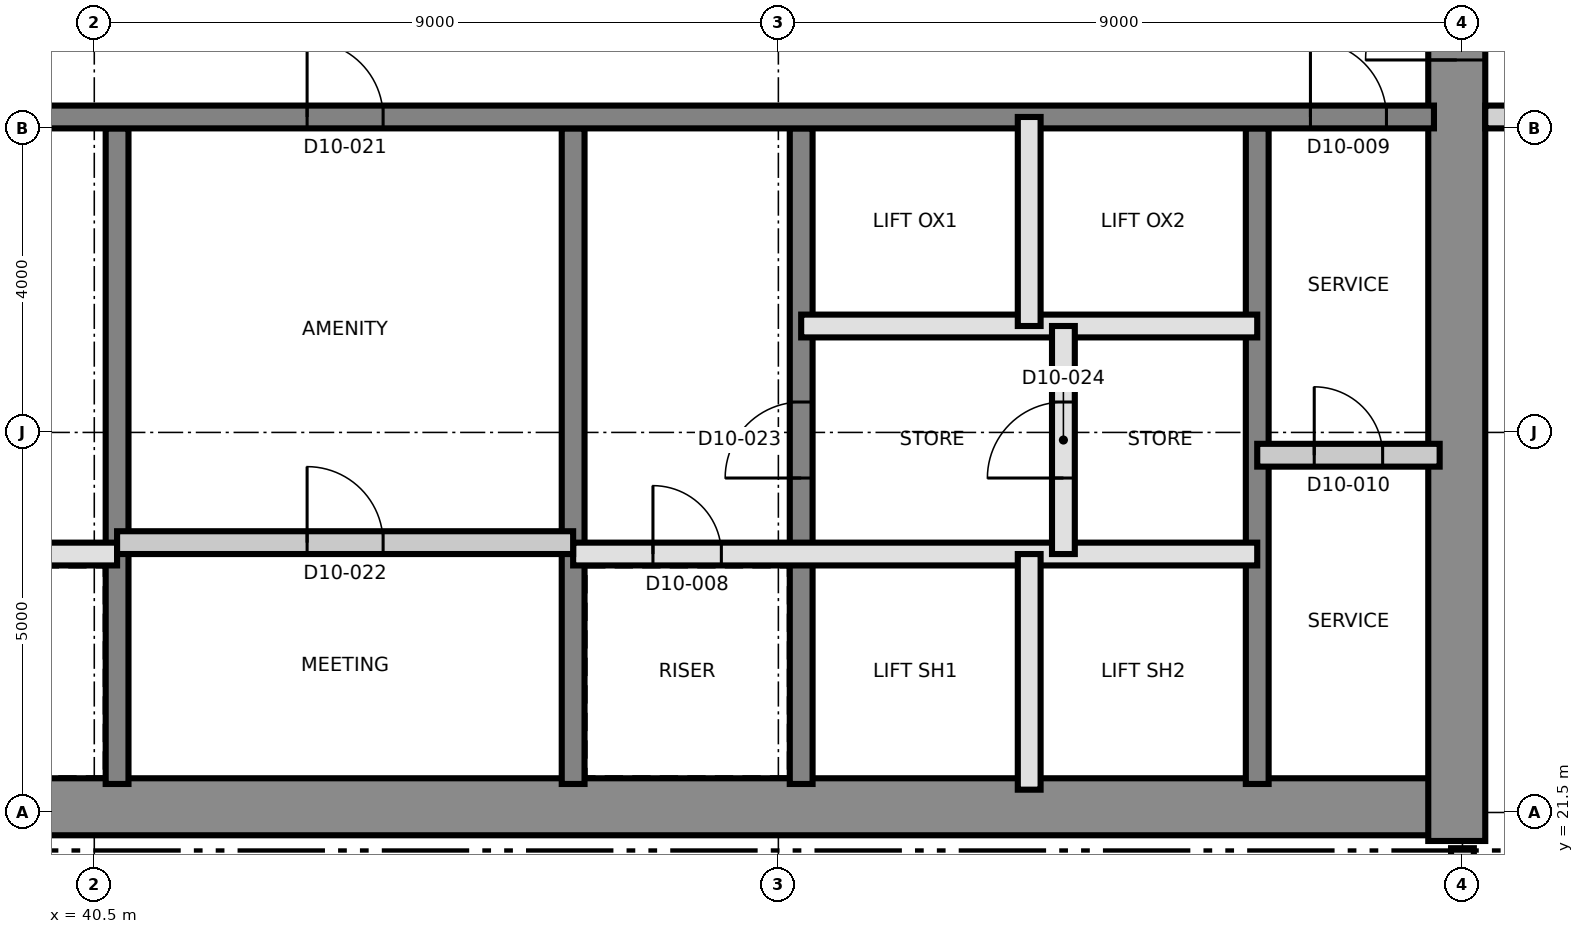
"""IFC4 building model, lengths in metres.
Left out: names, types, materials, properties, quantities, classifications, styles, units other than length and angle.
Written with IfcOpenShell. Run it as: python <this file> out.ifc"""

import sys

from ifc_helpers import new_model, si_unit, direction, frame, frame_2d, origin, place, context, subcontext, project, spatial, rectangle, extrude, element, fill, save


model = new_model("IFC4")
c1 = context("Model", 3, precision=1e-05, world=origin(), true_north=direction((0.0, 1.0)))
c2 = subcontext(c1, "Body", "Model", "MODEL_VIEW")
j1 = project(units=[si_unit("LENGTHUNIT", "METRE"), si_unit("PLANEANGLEUNIT", "RADIAN")], contexts=[c1])
p1 = place(None, origin())
s1 = spatial("IfcSite", under=j1, at=p1, CompositionType="ELEMENT")
p2 = place(p1, origin())
s2 = spatial("IfcBuilding", under=s1, at=p2, CompositionType="ELEMENT")
p3 = place(p2, frame((0.0, 0.0, 116.7)))
s3 = spatial("IfcBuildingStorey", under=s2, at=p3, CompositionType="ELEMENT", Elevation=116.7)
p4 = place(p3, frame((31.125, 21.575, 0.0), z_axis=(0.0, 0.0, 1.0), x_axis=(1.0, 0.0, 0.0)))
e1 = element("IfcWall", 1, at=p4, inside=s3, PredefinedType="SHEAR", context=c2, shape_type="SweptSolid", body=[
    extrude(rectangle(XDim=27.0, YDim=0.75, at=frame_2d((13.5, 0.0))), origin(), (0.0, 0.0, 1.0), 3.7),
])
p5 = place(p3, frame((58.425, 21.125, 0.0), z_axis=(0.0, 0.0, 1.0), x_axis=(0.0, 1.0, 0.0)))
e2 = element("IfcWall", 2, at=p5, inside=s3, PredefinedType="SHEAR", context=c2, shape_type="SweptSolid", body=[
    extrude(rectangle(XDim=18.75, YDim=0.75, at=frame_2d((9.375, 0.0))), origin(), (0.0, 0.0, 1.0), 3.7),
])
p6 = place(p5, frame((10.275, 0.0, 0.0)))
e3 = element("IfcOpeningElement", 3, at=p6, cuts=e2, PredefinedType="OPENING", context=c2, shape_type="SweptSolid", body=[
    extrude(rectangle(XDim=1.2, YDim=2.1, at=frame_2d((0.6, 1.05))), frame((0.0, 0.385, 0.0), z_axis=(0.0, -1.0, 0.0), x_axis=(1.0, 0.0, 0.0)), (0.0, 0.0, 1.0), 0.77),
])
for number, where, z_axis, x_axis in (
    (4, (40.8, 21.875, 0.0), (0.0, 0.0, 1.0), (0.0, 1.0, 0.0)),
    (5, (46.8, 21.875, 0.0), (0.0, 0.0, 1.0), (0.0, 1.0, 0.0)),
):
    element("IfcWall", number, at=place(p3, frame(where, z_axis=z_axis, x_axis=x_axis)), inside=s3, PredefinedType="SHEAR", context=c2, shape_type="SweptSolid", body=[
        extrude(rectangle(XDim=8.625, YDim=0.3, at=frame_2d((4.312, 0.0))), origin(), (0.0, 0.0, 1.0), 3.7),
    ])
p7 = place(p3, frame((49.8, 21.875, 0.0), z_axis=(0.0, 0.0, 1.0), x_axis=(0.0, 1.0, 0.0)))
e6 = element("IfcWall", 6, at=p7, inside=s3, PredefinedType="SHEAR", context=c2, shape_type="SweptSolid", body=[
    extrude(rectangle(XDim=8.625, YDim=0.3, at=frame_2d((4.312, 0.0))), origin(), (0.0, 0.0, 1.0), 3.7),
])
p8 = place(p7, frame((4.025, 0.0, 0.0)))
e7 = element("IfcOpeningElement", 7, at=p8, cuts=e6, PredefinedType="OPENING", context=c2, shape_type="SweptSolid", body=[
    extrude(rectangle(XDim=1.0, YDim=2.1, at=frame_2d((0.5, 1.05))), frame((0.0, 0.16, 0.0), z_axis=(0.0, -1.0, 0.0), x_axis=(1.0, 0.0, 0.0)), (0.0, 0.0, 1.0), 0.32),
])
p9 = place(p3, frame((55.8, 21.875, 0.0), z_axis=(0.0, 0.0, 1.0), x_axis=(0.0, 1.0, 0.0)))
e8 = element("IfcWall", 8, at=p9, inside=s3, PredefinedType="SHEAR", context=c2, shape_type="SweptSolid", body=[
    extrude(rectangle(XDim=8.625, YDim=0.3, at=frame_2d((4.312, 0.0))), origin(), (0.0, 0.0, 1.0), 3.7),
])
p10 = place(p3, frame((31.875, 30.65, 0.0), z_axis=(0.0, 0.0, 1.0), x_axis=(1.0, 0.0, 0.0)))
e9 = element("IfcWall", 9, at=p10, inside=s3, PredefinedType="SHEAR", context=c2, shape_type="SweptSolid", body=[
    extrude(rectangle(XDim=26.25, YDim=0.3, at=frame_2d((13.125, 0.0))), origin(), (0.0, 0.0, 1.0), 3.7),
])
p11 = place(p10, frame((24.625, 0.0, 0.0)))
e10 = element("IfcOpeningElement", 10, at=p11, cuts=e9, PredefinedType="OPENING", context=c2, shape_type="SweptSolid", body=[
    extrude(rectangle(XDim=1.0, YDim=2.1, at=frame_2d((0.5, 1.05))), frame((0.0, 0.16, 0.0), z_axis=(0.0, -1.0, 0.0), x_axis=(1.0, 0.0, 0.0)), (0.0, 0.0, 1.0), 0.32),
])
p12 = place(p10, frame((11.425, 0.0, 0.0)))
e11 = element("IfcOpeningElement", 11, at=p12, cuts=e9, PredefinedType="OPENING", context=c2, shape_type="SweptSolid", body=[
    extrude(rectangle(XDim=1.0, YDim=2.1, at=frame_2d((0.5, 1.05))), frame((0.0, 0.16, 0.0), z_axis=(0.0, -1.0, 0.0), x_axis=(1.0, 0.0, 0.0)), (0.0, 0.0, 1.0), 0.32),
])
p13 = place(p3, frame((31.8, 24.9, 0.0), z_axis=(0.0, 0.0, 1.0), x_axis=(1.0, 0.0, 0.0)))
e12 = element("IfcWall", 12, at=p13, inside=s3, PredefinedType="SOLIDWALL", context=c2, shape_type="SweptSolid", body=[
    extrude(rectangle(XDim=9.0, YDim=0.3, at=frame_2d((4.5, 0.0))), origin(), (0.0, 0.0, 1.0), 3.4),
])
p14 = place(p13, frame((7.05, 0.0, 0.0)))
e13 = element("IfcOpeningElement", 13, at=p14, cuts=e12, PredefinedType="OPENING", context=c2, shape_type="SweptSolid", body=[
    extrude(rectangle(XDim=0.9, YDim=2.1, at=frame_2d((0.45, 1.05))), frame((0.0, 0.16, 0.0), z_axis=(0.0, -1.0, 0.0), x_axis=(1.0, 0.0, 0.0)), (0.0, 0.0, 1.0), 0.32),
])
p15 = place(p13, frame((0.95, 0.0, 0.0)))
e14 = element("IfcOpeningElement", 14, at=p15, cuts=e12, PredefinedType="OPENING", context=c2, shape_type="SweptSolid", body=[
    extrude(rectangle(XDim=1.1, YDim=2.4, at=frame_2d((0.55, 1.2))), frame((0.0, 0.16, 0.0), z_axis=(0.0, -1.0, 0.0), x_axis=(1.0, 0.0, 0.0)), (0.0, 0.0, 1.0), 0.32),
])
p16 = place(p13, frame((3.95, 0.0, 0.0)))
e15 = element("IfcOpeningElement", 15, at=p16, cuts=e12, PredefinedType="OPENING", context=c2, shape_type="SweptSolid", body=[
    extrude(rectangle(XDim=1.1, YDim=2.4, at=frame_2d((0.55, 1.2))), frame((0.0, 0.16, 0.0), z_axis=(0.0, -1.0, 0.0), x_axis=(1.0, 0.0, 0.0)), (0.0, 0.0, 1.0), 0.32),
])
p17 = place(p3, frame((46.8, 24.9, 0.0), z_axis=(0.0, 0.0, 1.0), x_axis=(1.0, 0.0, 0.0)))
e16 = element("IfcWall", 16, at=p17, inside=s3, PredefinedType="SOLIDWALL", context=c2, shape_type="SweptSolid", body=[
    extrude(rectangle(XDim=9.0, YDim=0.3, at=frame_2d((4.5, 0.0))), origin(), (0.0, 0.0, 1.0), 3.4),
])
p18 = place(p17, frame((1.05, 0.0, 0.0)))
e17 = element("IfcOpeningElement", 17, at=p18, cuts=e16, PredefinedType="OPENING", context=c2, shape_type="SweptSolid", body=[
    extrude(rectangle(XDim=0.9, YDim=2.1, at=frame_2d((0.45, 1.05))), frame((0.0, 0.16, 0.0), z_axis=(0.0, -1.0, 0.0), x_axis=(1.0, 0.0, 0.0)), (0.0, 0.0, 1.0), 0.32),
])
p19 = place(p3, frame((40.8, 25.05, 0.0), z_axis=(0.0, 0.0, 1.0), x_axis=(1.0, 0.0, 0.0)))
e18 = element("IfcWall", 18, at=p19, inside=s3, PredefinedType="PARTITIONING", context=c2, shape_type="SweptSolid", body=[
    extrude(rectangle(XDim=6.0, YDim=0.3, at=frame_2d((3.0, 0.0))), origin(), (0.0, 0.0, 1.0), 3.4),
])
p20 = place(p19, frame((2.5, 0.0, 0.0)))
e19 = element("IfcOpeningElement", 19, at=p20, cuts=e18, PredefinedType="OPENING", context=c2, shape_type="SweptSolid", body=[
    extrude(rectangle(XDim=1.0, YDim=2.1, at=frame_2d((0.5, 1.05))), frame((0.0, 0.16, 0.0), z_axis=(0.0, -1.0, 0.0), x_axis=(1.0, 0.0, 0.0)), (0.0, 0.0, 1.0), 0.32),
])
p21 = place(p3, frame((55.8, 26.2, 0.0), z_axis=(0.0, 0.0, 1.0), x_axis=(1.0, 0.0, 0.0)))
e20 = element("IfcWall", 20, at=p21, inside=s3, PredefinedType="PARTITIONING", context=c2, shape_type="SweptSolid", body=[
    extrude(rectangle(XDim=2.4, YDim=0.3, at=frame_2d((1.2, 0.0))), origin(), (0.0, 0.0, 1.0), 3.4),
])
p22 = place(p21, frame((0.75, 0.0, 0.0)))
e21 = element("IfcOpeningElement", 21, at=p22, cuts=e20, PredefinedType="OPENING", context=c2, shape_type="SweptSolid", body=[
    extrude(rectangle(XDim=0.9, YDim=2.1, at=frame_2d((0.45, 1.05))), frame((0.0, 0.16, 0.0), z_axis=(0.0, -1.0, 0.0), x_axis=(1.0, 0.0, 0.0)), (0.0, 0.0, 1.0), 0.32),
])
p23 = place(p3, frame((49.8, 27.9, 0.0), z_axis=(0.0, 0.0, 1.0), x_axis=(1.0, 0.0, 0.0)))
e22 = element("IfcWall", 22, at=p23, inside=s3, PredefinedType="SOLIDWALL", context=c2, shape_type="SweptSolid", body=[
    extrude(rectangle(XDim=6.0, YDim=0.3, at=frame_2d((3.0, 0.0))), origin(), (0.0, 0.0, 1.0), 3.4),
])
p24 = place(p3, frame((52.8, 21.8, 0.0), z_axis=(0.0, 0.0, 1.0), x_axis=(0.0, 1.0, 0.0)))
e23 = element("IfcWall", 23, at=p24, inside=s3, PredefinedType="SOLIDWALL", context=c2, shape_type="SweptSolid", body=[
    extrude(rectangle(XDim=3.1, YDim=0.3, at=frame_2d((1.55, 0.0))), origin(), (0.0, 0.0, 1.0), 3.4),
])
p25 = place(p3, frame((52.8, 27.9, 0.0), z_axis=(0.0, 0.0, 1.0), x_axis=(0.0, 1.0, 0.0)))
e24 = element("IfcWall", 24, at=p25, inside=s3, PredefinedType="SOLIDWALL", context=c2, shape_type="SweptSolid", body=[
    extrude(rectangle(XDim=2.75, YDim=0.3, at=frame_2d((1.375, 0.0))), origin(), (0.0, 0.0, 1.0), 3.4),
])
p26 = place(p3, frame((53.25, 24.9, 0.0), z_axis=(0.0, 0.0, 1.0), x_axis=(0.0, 1.0, 0.0)))
e25 = element("IfcWall", 25, at=p26, inside=s3, PredefinedType="SOLIDWALL", context=c2, shape_type="SweptSolid", body=[
    extrude(rectangle(XDim=3.0, YDim=0.3, at=frame_2d((1.5, 0.0))), origin(), (0.0, 0.0, 1.0), 3.4),
])
p27 = place(p26, frame((1.0, 0.0, 0.0)))
e26 = element("IfcOpeningElement", 26, at=p27, cuts=e25, PredefinedType="OPENING", context=c2, shape_type="SweptSolid", body=[
    extrude(rectangle(XDim=1.0, YDim=2.1, at=frame_2d((0.5, 1.05))), frame((0.0, 0.16, 0.0), z_axis=(0.0, -1.0, 0.0), x_axis=(1.0, 0.0, 0.0)), (0.0, 0.0, 1.0), 0.32),
])
p28 = place(p3, frame((58.8, 30.65, 0.0), z_axis=(0.0, 0.0, 1.0), x_axis=(1.0, 0.0, 0.0)))
e27 = element("IfcWall", 27, at=p28, inside=s3, PredefinedType="PARTITIONING", context=c2, shape_type="SweptSolid", body=[
    extrude(rectangle(XDim=26.53, YDim=0.3, at=frame_2d((13.265, 0.0))), origin(), (0.0, 0.0, 1.0), 3.4),
])
p29 = place(p28, frame((0.835, 0.0, 0.0)))
e28 = element("IfcOpeningElement", 28, at=p29, cuts=e27, PredefinedType="OPENING", context=c2, shape_type="SweptSolid", body=[
    extrude(rectangle(XDim=1.2, YDim=2.1, at=frame_2d((0.6, 1.05))), frame((0.0, 0.16, 0.0), z_axis=(0.0, -1.0, 0.0), x_axis=(1.0, 0.0, 0.0)), (0.0, 0.0, 1.0), 0.32),
])
p30 = place(p28, frame((4.085, 0.0, 0.0)))
e29 = element("IfcOpeningElement", 29, at=p30, cuts=e27, PredefinedType="OPENING", context=c2, shape_type="SweptSolid", body=[
    extrude(rectangle(XDim=1.0, YDim=2.1, at=frame_2d((0.5, 1.05))), frame((0.0, 0.16, 0.0), z_axis=(0.0, -1.0, 0.0), x_axis=(1.0, 0.0, 0.0)), (0.0, 0.0, 1.0), 0.32),
])
p31 = place(p28, frame((12.7, 0.0, 0.0)))
e30 = element("IfcOpeningElement", 30, at=p31, cuts=e27, PredefinedType="OPENING", context=c2, shape_type="SweptSolid", body=[
    extrude(rectangle(XDim=1.0, YDim=2.4, at=frame_2d((0.5, 1.2))), frame((0.0, 0.16, 0.0), z_axis=(0.0, -1.0, 0.0), x_axis=(1.0, 0.0, 0.0)), (0.0, 0.0, 1.0), 0.32),
])
p32 = place(p28, frame((21.7, 0.0, 0.0)))
e31 = element("IfcOpeningElement", 31, at=p32, cuts=e27, PredefinedType="OPENING", context=c2, shape_type="SweptSolid", body=[
    extrude(rectangle(XDim=1.0, YDim=2.4, at=frame_2d((0.5, 1.2))), frame((0.0, 0.16, 0.0), z_axis=(0.0, -1.0, 0.0), x_axis=(1.0, 0.0, 0.0)), (0.0, 0.0, 1.0), 0.32),
])
p33 = place(p3, frame((58.5, 19.275, 0.0), z_axis=(0.0, 0.0, 1.0), x_axis=(0.0, 1.0, 0.0)))
e32 = element("IfcWall", 32, at=p33, inside=s3, PredefinedType="PARTITIONING", context=c2, shape_type="SweptSolid", body=[
    extrude(rectangle(XDim=1.755, YDim=0.3, at=frame_2d((0.877, 0.0))), origin(), (0.0, 0.0, 1.0), 3.4),
])
p34 = place(p18, origin())
e33 = element("IfcDoor", 33, at=p34, inside=s3, OperationType="SINGLE_SWING_RIGHT", PredefinedType="DOOR", context=c2, shape_type="SweptSolid", body=[
    extrude(rectangle(XDim=0.9, YDim=2.1, at=frame_2d((0.45, 1.05))), frame((0.0, 0.025, 0.0), z_axis=(0.0, -1.0, 0.0), x_axis=(1.0, 0.0, 0.0)), (0.0, 0.0, 1.0), 0.05),
])
fill(e17, e33)
p35 = place(p11, origin())
e34 = element("IfcDoor", 34, at=p35, inside=s3, OperationType="SINGLE_SWING_LEFT", PredefinedType="DOOR", context=c2, shape_type="SweptSolid", body=[
    extrude(rectangle(XDim=1.0, YDim=2.1, at=frame_2d((0.5, 1.05))), frame((0.0, 0.025, 0.0), z_axis=(0.0, -1.0, 0.0), x_axis=(1.0, 0.0, 0.0)), (0.0, 0.0, 1.0), 0.05),
])
fill(e10, e34)
p36 = place(p22, origin())
e35 = element("IfcDoor", 35, at=p36, inside=s3, OperationType="SINGLE_SWING_RIGHT", PredefinedType="DOOR", context=c2, shape_type="SweptSolid", body=[
    extrude(rectangle(XDim=0.9, YDim=2.1, at=frame_2d((0.45, 1.05))), frame((0.0, 0.025, 0.0), z_axis=(0.0, -1.0, 0.0), x_axis=(1.0, 0.0, 0.0)), (0.0, 0.0, 1.0), 0.05),
])
fill(e21, e35)
p37 = place(p6, origin())
e36 = element("IfcDoor", 36, at=p37, inside=s3, OperationType="SINGLE_SWING_LEFT", PredefinedType="DOOR", context=c2, shape_type="SweptSolid", body=[
    extrude(rectangle(XDim=1.2, YDim=2.1, at=frame_2d((0.6, 1.05))), frame((0.0, 0.025, 0.0), z_axis=(0.0, -1.0, 0.0), x_axis=(1.0, 0.0, 0.0)), (0.0, 0.0, 1.0), 0.05),
])
fill(e3, e36)
p38 = place(p12, origin())
e37 = element("IfcDoor", 37, at=p38, inside=s3, OperationType="SINGLE_SWING_LEFT", PredefinedType="DOOR", context=c2, shape_type="SweptSolid", body=[
    extrude(rectangle(XDim=1.0, YDim=2.1, at=frame_2d((0.5, 1.05))), frame((0.0, 0.025, 0.0), z_axis=(0.0, -1.0, 0.0), x_axis=(1.0, 0.0, 0.0)), (0.0, 0.0, 1.0), 0.05),
])
fill(e11, e37)
p39 = place(p20, origin())
e38 = element("IfcDoor", 38, at=p39, inside=s3, OperationType="SINGLE_SWING_RIGHT", PredefinedType="DOOR", context=c2, shape_type="SweptSolid", body=[
    extrude(rectangle(XDim=1.0, YDim=2.1, at=frame_2d((0.5, 1.05))), frame((0.0, 0.025, 0.0), z_axis=(0.0, -1.0, 0.0), x_axis=(1.0, 0.0, 0.0)), (0.0, 0.0, 1.0), 0.05),
])
fill(e19, e38)
p40 = place(p8, origin())
e39 = element("IfcDoor", 39, at=p40, inside=s3, OperationType="SINGLE_SWING_LEFT", PredefinedType="DOOR", context=c2, shape_type="SweptSolid", body=[
    extrude(rectangle(XDim=1.0, YDim=2.1, at=frame_2d((0.5, 1.05))), frame((0.0, 0.025, 0.0), z_axis=(0.0, -1.0, 0.0), x_axis=(1.0, 0.0, 0.0)), (0.0, 0.0, 1.0), 0.05),
])
fill(e7, e39)
p41 = place(p27, origin())
e40 = element("IfcDoor", 40, at=p41, inside=s3, OperationType="SINGLE_SWING_RIGHT", PredefinedType="DOOR", context=c2, shape_type="SweptSolid", body=[
    extrude(rectangle(XDim=1.0, YDim=2.1, at=frame_2d((0.5, 1.05))), frame((0.0, 0.025, 0.0), z_axis=(0.0, -1.0, 0.0), x_axis=(1.0, 0.0, 0.0)), (0.0, 0.0, 1.0), 0.05),
])
fill(e26, e40)
save(model, sys.argv[1])
